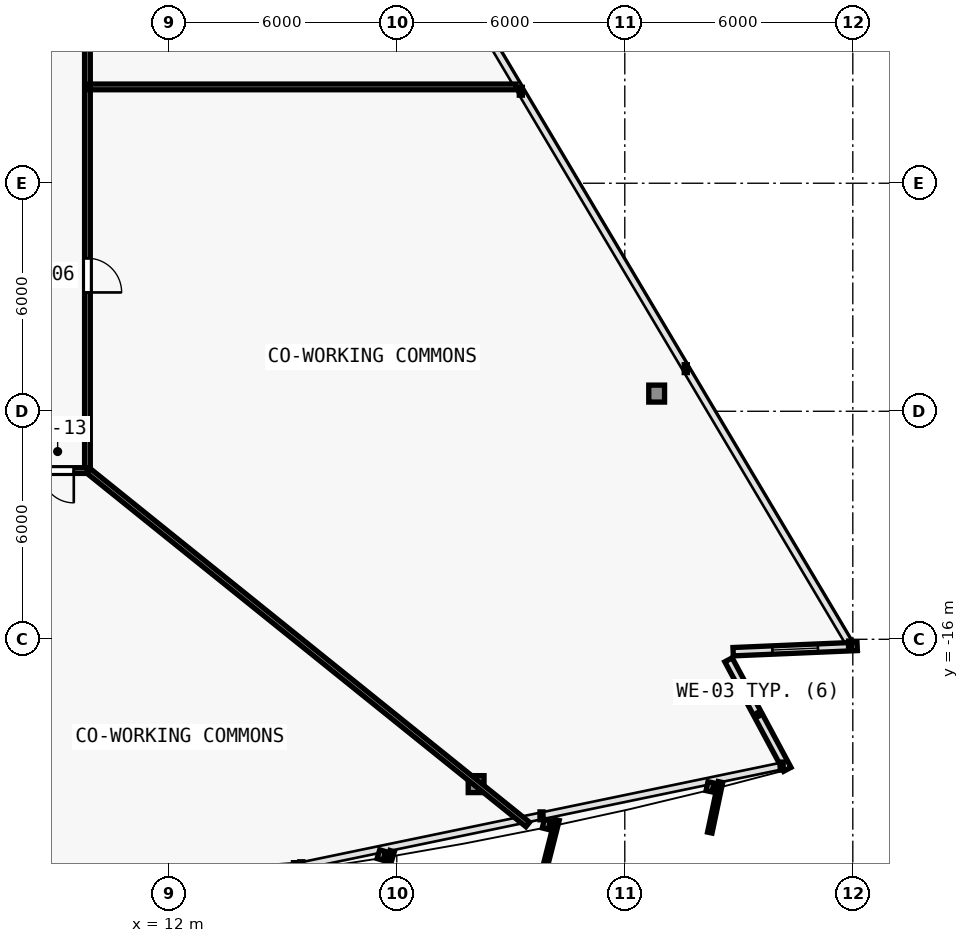
"""IFC4 building model, lengths in metres.
Left out: names, types, materials, properties, quantities, classifications, styles, units other than length and angle.
Written with IfcOpenShell. Run it as: python <this file> out.ifc"""

import sys

from ifc_helpers import new_model, si_unit, direction, frame, frame_2d, origin, origin_2d, place, context, subcontext, project, spatial, rectangle, i_section, extrude, element, fill, save


model = new_model("IFC4")
c1 = context("Model", 3, precision=1e-05, world=origin(), true_north=direction((0.0, 1.0)))
c2 = subcontext(c1, "Body", "Model", "MODEL_VIEW")
j1 = project(units=[si_unit("LENGTHUNIT", "METRE"), si_unit("PLANEANGLEUNIT", "RADIAN")], contexts=[c1])
p1 = place(None, origin())
s1 = spatial("IfcSite", under=j1, at=p1, CompositionType="ELEMENT")
p2 = place(p1, origin())
s2 = spatial("IfcBuilding", under=s1, at=p2, CompositionType="ELEMENT")
p3 = place(p2, frame((0.0, 0.0, 40.8)))
s3 = spatial("IfcBuildingStorey", under=s2, at=p3, CompositionType="ELEMENT", Elevation=40.8)
p4 = place(p3, frame((20.088, -19.811, 0.005), z_axis=(-0.021205716244, 0.034391321857, 0.999183443908), x_axis=(-0.851195920716, -0.524848077596, 0.0)))
e1 = element("IfcColumn", 1, at=p4, inside=s3, PredefinedType="COLUMN", context=c2, shape_type="SweptSolid", body=[
    extrude(i_section(OverallWidth=0.416, OverallDepth=0.446, WebThickness=0.025, FlangeThickness=0.04, FilletRadius=0.015, at=origin_2d()), origin(), (0.0, 0.0, 1.0), 3.592),
])
p5 = place(p3, frame((24.839, -9.535, 0.005), z_axis=(-0.02685258958, 0.022229865298, 0.999392201051), x_axis=(-0.637687438134, -0.770295223434, 0.0)))
e2 = element("IfcColumn", 2, at=p5, inside=s3, PredefinedType="COLUMN", context=c2, shape_type="SweptSolid", body=[
    extrude(i_section(OverallWidth=0.416, OverallDepth=0.446, WebThickness=0.025, FlangeThickness=0.04, FilletRadius=0.015, at=origin_2d()), origin(), (0.0, 0.0, 1.0), 3.591),
])
p6 = place(p3, frame((26.729, -16.54, 0.0), z_axis=(0.0, 0.0, 1.0), x_axis=(0.472830429959, -0.881153439819, 0.0)))
e3 = element("IfcWall", 3, at=p6, inside=s3, PredefinedType="SOLIDWALL", context=c2, shape_type="SweptSolid", body=[
    extrude(rectangle(XDim=3.27, YDim=0.22, at=frame_2d((1.635, 0.0))), origin(), (0.0, 0.0, 1.0), 3.35),
])
p7 = place(p3, frame((30.115, -16.188, 0.0), z_axis=(0.0, 0.0, 1.0), x_axis=(-0.999095638069, -0.042519477791, 0.0)))
e4 = element("IfcWall", 4, at=p7, inside=s3, PredefinedType="SOLIDWALL", context=c2, shape_type="SweptSolid", body=[
    extrude(rectangle(XDim=3.267, YDim=0.22, at=frame_2d((1.634, 0.0))), origin(), (0.0, 0.0, 1.0), 3.35),
])
p8 = place(p7, frame((1.033, 0.0, 0.62)))
e5 = element("IfcOpeningElement", 5, at=p8, cuts=e4, PredefinedType="OPENING", context=c2, shape_type="SweptSolid", body=[
    extrude(rectangle(XDim=1.2, YDim=1.8, at=frame_2d((0.6, 0.9))), frame((0.0, 0.12, 0.0), z_axis=(0.0, -1.0, 0.0), x_axis=(1.0, 0.0, 0.0)), (0.0, 0.0, 1.0), 0.24),
])
p9 = place(p3, frame((9.86, 8.426, 0.0), z_axis=(0.0, 0.0, 1.0), x_axis=(0.0, -1.0, 0.0)))
e6 = element("IfcWall", 6, at=p9, inside=s3, PredefinedType="PARTITIONING", context=c2, shape_type="SweptSolid", body=[
    extrude(rectangle(XDim=19.986, YDim=0.15, at=frame_2d((9.993, 0.0))), origin(), (0.0, 0.0, 1.0), 2.609),
])
p10 = place(p9, frame((14.399, 0.0, 0.0)))
e7 = element("IfcOpeningElement", 7, at=p10, cuts=e6, PredefinedType="OPENING", context=c2, shape_type="SweptSolid", body=[
    extrude(rectangle(XDim=0.9, YDim=2.1, at=frame_2d((0.45, 1.05))), frame((0.0, 0.085, 0.0), z_axis=(0.0, -1.0, 0.0), x_axis=(1.0, 0.0, 0.0)), (0.0, 0.0, 1.0), 0.17),
])
p11 = place(p3, frame((9.86, -11.56, 0.0), z_axis=(0.0, 0.0, 1.0), x_axis=(-1.0, 0.0, 0.0)))
e8 = element("IfcWall", 8, at=p11, inside=s3, PredefinedType="PARTITIONING", context=c2, shape_type="SweptSolid", body=[
    extrude(rectangle(XDim=6.78, YDim=0.15, at=frame_2d((3.39, 0.0))), origin(), (0.0, 0.0, 1.0), 2.609),
])
p12 = place(p11, frame((3.571, 0.0, 0.0)))
e9 = element("IfcOpeningElement", 9, at=p12, cuts=e8, PredefinedType="OPENING", context=c2, shape_type="SweptSolid", body=[
    extrude(rectangle(XDim=0.9, YDim=2.1, at=frame_2d((0.45, 1.05))), frame((0.0, 0.085, 0.0), z_axis=(0.0, -1.0, 0.0), x_axis=(1.0, 0.0, 0.0)), (0.0, 0.0, 1.0), 0.17),
])
p13 = place(p11, frame((0.359, 0.0, 0.0)))
e10 = element("IfcOpeningElement", 10, at=p13, cuts=e8, PredefinedType="OPENING", context=c2, shape_type="SweptSolid", body=[
    extrude(rectangle(XDim=0.85, YDim=2.1, at=frame_2d((0.425, 1.05))), frame((0.0, 0.085, 0.0), z_axis=(0.0, -1.0, 0.0), x_axis=(1.0, 0.0, 0.0)), (0.0, 0.0, 1.0), 0.17),
])
p14 = place(p3, frame((9.888, -11.569, 0.0), z_axis=(0.0, 0.0, 1.0), x_axis=(0.778962871417, -0.627070047884, 0.0)))
e11 = element("IfcWall", 11, at=p14, inside=s3, PredefinedType="PARTITIONING", context=c2, shape_type="SweptSolid", body=[
    extrude(rectangle(XDim=14.837, YDim=0.15, at=frame_2d((7.418, 0.0))), origin(), (0.0, 0.0, 1.0), 2.609),
])
p15 = place(p3, frame((9.92, -1.465, 0.0), z_axis=(0.0, 0.0, 1.0), x_axis=(1.0, 0.0, 0.0)))
e12 = element("IfcWall", 12, at=p15, inside=s3, PredefinedType="PARTITIONING", context=c2, shape_type="SweptSolid", body=[
    extrude(rectangle(XDim=11.218, YDim=0.15, at=frame_2d((5.609, 0.0))), origin(), (0.0, 0.0, 1.0), 2.725),
])
p16 = place(p8, origin())
e13 = element("IfcWindow", 13, at=p16, inside=s3, PartitioningType="SINGLE_PANEL", PredefinedType="WINDOW", context=c2, shape_type="SweptSolid", body=[
    extrude(rectangle(XDim=1.2, YDim=1.8, at=frame_2d((0.6, 0.9))), frame((0.0, 0.03, 0.0), z_axis=(0.0, -1.0, 0.0), x_axis=(1.0, 0.0, 0.0)), (0.0, 0.0, 1.0), 0.06),
])
fill(e5, e13)
p17 = place(p13, origin())
e14 = element("IfcDoor", 14, at=p17, inside=s3, OperationType="SINGLE_SWING_LEFT", PredefinedType="DOOR", context=c2, shape_type="SweptSolid", body=[
    extrude(rectangle(XDim=0.85, YDim=2.1, at=frame_2d((0.425, 1.05))), frame((0.0, 0.025, 0.0), z_axis=(0.0, -1.0, 0.0), x_axis=(1.0, 0.0, 0.0)), (0.0, 0.0, 1.0), 0.05),
])
fill(e10, e14)
p18 = place(p10, origin())
e15 = element("IfcDoor", 15, at=p18, inside=s3, OperationType="SINGLE_SWING_RIGHT", PredefinedType="DOOR", context=c2, shape_type="SweptSolid", body=[
    extrude(rectangle(XDim=0.9, YDim=2.1, at=frame_2d((0.45, 1.05))), frame((0.0, 0.025, 0.0), z_axis=(0.0, -1.0, 0.0), x_axis=(1.0, 0.0, 0.0)), (0.0, 0.0, 1.0), 0.05),
])
fill(e7, e15)
save(model, sys.argv[1])
